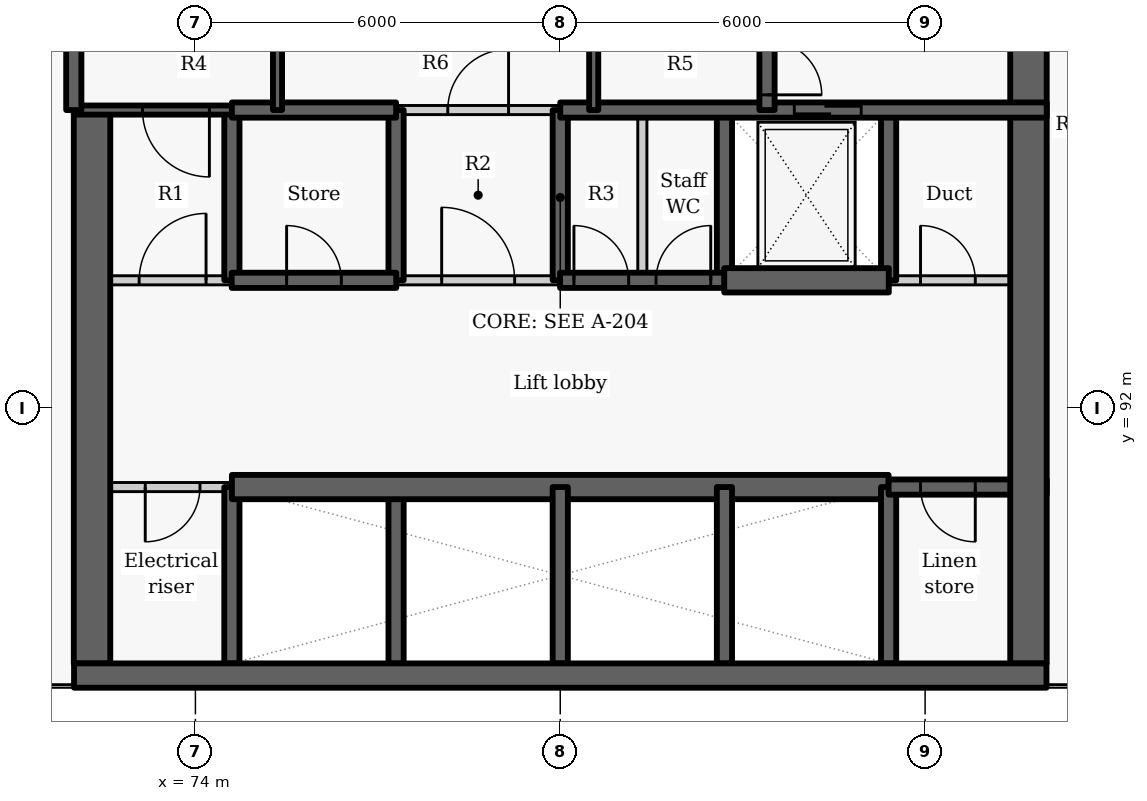
"""IFC4 building model, lengths in metres.
Left out: names, types, materials, properties, quantities, classifications, styles, units other than length and angle.
Written with IfcOpenShell. Run it as: python <this file> out.ifc"""

import sys

from ifc_helpers import new_model, si_unit, direction, frame, frame_2d, origin, place, context, subcontext, project, spatial, rectangle, extrude, element, fill, save


model = new_model("IFC4")
c1 = context("Model", 3, precision=1e-05, world=origin(), true_north=direction((0.0, 1.0)))
c2 = subcontext(c1, "Body", "Model", "MODEL_VIEW")
j1 = project(units=[si_unit("LENGTHUNIT", "METRE"), si_unit("PLANEANGLEUNIT", "RADIAN")], contexts=[c1])
p1 = place(None, origin())
s1 = spatial("IfcSite", under=j1, at=p1, CompositionType="ELEMENT")
p2 = place(p1, origin())
s2 = spatial("IfcBuilding", under=s1, at=p2, CompositionType="ELEMENT")
p3 = place(p2, frame((0.0, 0.0, 15.6)))
s3 = spatial("IfcBuildingStorey", under=s2, at=p3, CompositionType="ELEMENT", Elevation=15.6)
p4 = place(p3, frame((74.6, 87.8, -0.3), z_axis=(0.0, 0.0, 1.0), x_axis=(0.0, 1.0, 0.0)))
e1 = element("IfcWall", 1, at=p4, inside=s3, PredefinedType="SHEAR", context=c2, shape_type="SweptSolid", body=[
    extrude(rectangle(XDim=2.9, YDim=0.25, at=frame_2d((1.45, 0.0))), origin(), (0.0, 0.0, 1.0), 4.2),
])
p5 = place(p3, frame((74.6, 94.1, -0.3), z_axis=(0.0, 0.0, 1.0), x_axis=(0.0, 1.0, 0.0)))
e2 = element("IfcWall", 2, at=p5, inside=s3, PredefinedType="SHEAR", context=c2, shape_type="SweptSolid", body=[
    extrude(rectangle(XDim=2.8, YDim=0.25, at=frame_2d((1.4, 0.0))), origin(), (0.0, 0.0, 1.0), 4.2),
])
p6 = place(p3, frame((74.6, 90.7, 0.0), z_axis=(0.0, 0.0, 1.0), x_axis=(-1.0, 0.0, 0.0)))
e3 = element("IfcWall", 3, at=p6, inside=s3, PredefinedType="PARTITIONING", context=c2, shape_type="SweptSolid", body=[
    extrude(rectangle(XDim=2.6, YDim=0.15, at=frame_2d((1.3, 0.0))), origin(), (0.0, 0.0, 1.0), 3.9),
])
p7 = place(p6, frame((0.525, 0.0, 0.0)))
e4 = element("IfcOpeningElement", 4, at=p7, cuts=e3, PredefinedType="OPENING", context=c2, shape_type="SweptSolid", body=[
    extrude(rectangle(XDim=0.9, YDim=2.1, at=frame_2d((0.45, 1.05))), frame((0.0, 0.085, 0.0), z_axis=(0.0, -1.0, 0.0), x_axis=(1.0, 0.0, 0.0)), (0.0, 0.0, 1.0), 0.17),
])
p8 = place(p3, frame((72.3, 87.8, -0.3), z_axis=(0.0, 0.0, 1.0), x_axis=(0.0, 1.0, 0.0)))
e5 = element("IfcWall", 5, at=p8, inside=s3, PredefinedType="SHEAR", context=c2, shape_type="SweptSolid", body=[
    extrude(rectangle(XDim=9.1, YDim=0.6, at=frame_2d((4.55, 0.0))), origin(), (0.0, 0.0, 1.0), 4.2),
])
p9 = place(p3, frame((77.3, 87.8, -0.3), z_axis=(0.0, 0.0, 1.0), x_axis=(0.0, 1.0, 0.0)))
e6 = element("IfcWall", 6, at=p9, inside=s3, PredefinedType="SHEAR", context=c2, shape_type="SweptSolid", body=[
    extrude(rectangle(XDim=2.9, YDim=0.25, at=frame_2d((1.45, 0.0))), origin(), (0.0, 0.0, 1.0), 4.2),
])
p10 = place(p3, frame((77.3, 94.1, -0.3), z_axis=(0.0, 0.0, 1.0), x_axis=(0.0, 1.0, 0.0)))
e7 = element("IfcWall", 7, at=p10, inside=s3, PredefinedType="SHEAR", context=c2, shape_type="SweptSolid", body=[
    extrude(rectangle(XDim=2.8, YDim=0.25, at=frame_2d((1.4, 0.0))), origin(), (0.0, 0.0, 1.0), 4.2),
])
p11 = place(p3, frame((74.6, 90.7, -0.3), z_axis=(0.0, 0.0, 1.0), x_axis=(1.0, 0.0, 0.0)))
e8 = element("IfcWall", 8, at=p11, inside=s3, PredefinedType="SHEAR", context=c2, shape_type="SweptSolid", body=[
    extrude(rectangle(XDim=10.8, YDim=0.4, at=frame_2d((5.4, 0.0))), origin(), (0.0, 0.0, 1.0), 4.2),
])
p12 = place(p3, frame((80.0, 87.8, -0.3), z_axis=(0.0, 0.0, 1.0), x_axis=(0.0, 1.0, 0.0)))
e9 = element("IfcWall", 9, at=p12, inside=s3, PredefinedType="SHEAR", context=c2, shape_type="SweptSolid", body=[
    extrude(rectangle(XDim=2.9, YDim=0.25, at=frame_2d((1.45, 0.0))), origin(), (0.0, 0.0, 1.0), 4.2),
])
p13 = place(p3, frame((80.0, 94.1, -0.3), z_axis=(0.0, 0.0, 1.0), x_axis=(0.0, 1.0, 0.0)))
e10 = element("IfcWall", 10, at=p13, inside=s3, PredefinedType="SHEAR", context=c2, shape_type="SweptSolid", body=[
    extrude(rectangle(XDim=2.8, YDim=0.25, at=frame_2d((1.4, 0.0))), origin(), (0.0, 0.0, 1.0), 4.2),
])
p14 = place(p3, frame((82.7, 87.8, -0.3), z_axis=(0.0, 0.0, 1.0), x_axis=(0.0, 1.0, 0.0)))
e11 = element("IfcWall", 11, at=p14, inside=s3, PredefinedType="SHEAR", context=c2, shape_type="SweptSolid", body=[
    extrude(rectangle(XDim=2.9, YDim=0.25, at=frame_2d((1.45, 0.0))), origin(), (0.0, 0.0, 1.0), 4.2),
])
p15 = place(p3, frame((82.7, 94.1, -0.3), z_axis=(0.0, 0.0, 1.0), x_axis=(0.0, 1.0, 0.0)))
e12 = element("IfcWall", 12, at=p15, inside=s3, PredefinedType="SHEAR", context=c2, shape_type="SweptSolid", body=[
    extrude(rectangle(XDim=2.8, YDim=0.25, at=frame_2d((1.4, 0.0))), origin(), (0.0, 0.0, 1.0), 4.2),
])
p16 = place(p3, frame((85.4, 87.8, -0.3), z_axis=(0.0, 0.0, 1.0), x_axis=(0.0, 1.0, 0.0)))
e13 = element("IfcWall", 13, at=p16, inside=s3, PredefinedType="SHEAR", context=c2, shape_type="SweptSolid", body=[
    extrude(rectangle(XDim=2.9, YDim=0.25, at=frame_2d((1.45, 0.0))), origin(), (0.0, 0.0, 1.0), 4.2),
])
p17 = place(p3, frame((85.4, 94.1, -0.3), z_axis=(0.0, 0.0, 1.0), x_axis=(0.0, 1.0, 0.0)))
e14 = element("IfcWall", 14, at=p17, inside=s3, PredefinedType="SHEAR", context=c2, shape_type="SweptSolid", body=[
    extrude(rectangle(XDim=2.8, YDim=0.25, at=frame_2d((1.4, 0.0))), origin(), (0.0, 0.0, 1.0), 4.2),
])
p18 = place(p3, frame((88.0, 90.7, -0.3), z_axis=(0.0, 0.0, 1.0), x_axis=(-1.0, 0.0, 0.0)))
e15 = element("IfcWall", 15, at=p18, inside=s3, PredefinedType="SHEAR", context=c2, shape_type="SweptSolid", body=[
    extrude(rectangle(XDim=2.6, YDim=0.25, at=frame_2d((1.3, 0.0))), origin(), (0.0, 0.0, 1.0), 4.2),
])
p19 = place(p18, frame((1.175, 0.0, 0.3)))
e16 = element("IfcOpeningElement", 16, at=p19, cuts=e15, PredefinedType="OPENING", context=c2, shape_type="SweptSolid", body=[
    extrude(rectangle(XDim=0.9, YDim=2.1, at=frame_2d((0.45, 1.05))), frame((0.0, 0.135, 0.0), z_axis=(0.0, -1.0, 0.0), x_axis=(1.0, 0.0, 0.0)), (0.0, 0.0, 1.0), 0.27),
])
p20 = place(p3, frame((87.7, 103.4, -0.3), z_axis=(0.0, 0.0, 1.0), x_axis=(0.0, -1.0, 0.0)))
e17 = element("IfcWall", 17, at=p20, inside=s3, PredefinedType="SHEAR", context=c2, shape_type="SweptSolid", body=[
    extrude(rectangle(XDim=15.6, YDim=0.6, at=frame_2d((7.8, 0.0))), origin(), (0.0, 0.0, 1.0), 4.2),
])
p21 = place(p20, frame((2.7, 0.0, 0.3)))
e18 = element("IfcOpeningElement", 18, at=p21, cuts=e17, PredefinedType="OPENING", context=c2, shape_type="SweptSolid", body=[
    extrude(rectangle(XDim=1.1, YDim=2.1, at=frame_2d((0.55, 1.05))), frame((0.0, 0.31, 0.0), z_axis=(0.0, -1.0, 0.0), x_axis=(1.0, 0.0, 0.0)), (0.0, 0.0, 1.0), 0.62),
])
p22 = place(p3, frame((72.0, 94.1, 0.0), z_axis=(0.0, 0.0, 1.0), x_axis=(1.0, 0.0, 0.0)))
e19 = element("IfcWall", 19, at=p22, inside=s3, PredefinedType="PARTITIONING", context=c2, shape_type="SweptSolid", body=[
    extrude(rectangle(XDim=2.603, YDim=0.15, at=frame_2d((1.302, 0.0))), origin(), (0.0, 0.0, 1.0), 3.9),
])
p23 = place(p22, frame((1.075, 0.0, 0.0)))
e20 = element("IfcOpeningElement", 20, at=p23, cuts=e19, PredefinedType="OPENING", context=c2, shape_type="SweptSolid", body=[
    extrude(rectangle(XDim=1.1, YDim=2.1, at=frame_2d((0.55, 1.05))), frame((0.0, 0.085, 0.0), z_axis=(0.0, -1.0, 0.0), x_axis=(1.0, 0.0, 0.0)), (0.0, 0.0, 1.0), 0.17),
])
p24 = place(p3, frame((77.297, 94.1, 0.0), z_axis=(0.0, 0.0, 1.0), x_axis=(1.0, 0.0, 0.0)))
e21 = element("IfcWall", 21, at=p24, inside=s3, PredefinedType="PARTITIONING", context=c2, shape_type="SweptSolid", body=[
    extrude(rectangle(XDim=2.706, YDim=0.15, at=frame_2d((1.353, 0.0))), origin(), (0.0, 0.0, 1.0), 3.9),
])
p25 = place(p24, frame((0.753, 0.0, 0.0)))
e22 = element("IfcOpeningElement", 22, at=p25, cuts=e21, PredefinedType="OPENING", context=c2, shape_type="SweptSolid", body=[
    extrude(rectangle(XDim=1.2, YDim=2.1, at=frame_2d((0.6, 1.05))), frame((0.0, 0.085, 0.0), z_axis=(0.0, -1.0, 0.0), x_axis=(1.0, 0.0, 0.0)), (0.0, 0.0, 1.0), 0.17),
])
p26 = place(p3, frame((85.397, 94.1, 0.0), z_axis=(0.0, 0.0, 1.0), x_axis=(1.0, 0.0, 0.0)))
e23 = element("IfcWall", 23, at=p26, inside=s3, PredefinedType="PARTITIONING", context=c2, shape_type="SweptSolid", body=[
    extrude(rectangle(XDim=2.603, YDim=0.15, at=frame_2d((1.302, 0.0))), origin(), (0.0, 0.0, 1.0), 3.9),
])
p27 = place(p26, frame((0.528, 0.0, 0.0)))
e24 = element("IfcOpeningElement", 24, at=p27, cuts=e23, PredefinedType="OPENING", context=c2, shape_type="SweptSolid", body=[
    extrude(rectangle(XDim=0.9, YDim=2.1, at=frame_2d((0.45, 1.05))), frame((0.0, 0.085, 0.0), z_axis=(0.0, -1.0, 0.0), x_axis=(1.0, 0.0, 0.0)), (0.0, 0.0, 1.0), 0.17),
])
p28 = place(p3, frame((74.597, 94.1, -0.3), z_axis=(0.0, 0.0, 1.0), x_axis=(1.0, 0.0, 0.0)))
e25 = element("IfcWall", 25, at=p28, inside=s3, PredefinedType="SHEAR", context=c2, shape_type="SweptSolid", body=[
    extrude(rectangle(XDim=2.706, YDim=0.25, at=frame_2d((1.353, 0.0))), origin(), (0.0, 0.0, 1.0), 4.2),
])
p29 = place(p28, frame((0.903, 0.0, 0.3)))
e26 = element("IfcOpeningElement", 26, at=p29, cuts=e25, PredefinedType="OPENING", context=c2, shape_type="SweptSolid", body=[
    extrude(rectangle(XDim=0.9, YDim=2.1, at=frame_2d((0.45, 1.05))), frame((0.0, 0.135, 0.0), z_axis=(0.0, -1.0, 0.0), x_axis=(1.0, 0.0, 0.0)), (0.0, 0.0, 1.0), 0.27),
])
p30 = place(p3, frame((79.997, 94.1, -0.3), z_axis=(0.0, 0.0, 1.0), x_axis=(1.0, 0.0, 0.0)))
e27 = element("IfcWall", 27, at=p30, inside=s3, PredefinedType="SHEAR", context=c2, shape_type="SweptSolid", body=[
    extrude(rectangle(XDim=2.706, YDim=0.25, at=frame_2d((1.353, 0.0))), origin(), (0.0, 0.0, 1.0), 4.2),
])
p31 = place(p30, frame((0.228, 0.0, 0.3)))
e28 = element("IfcOpeningElement", 28, at=p31, cuts=e27, PredefinedType="OPENING", context=c2, shape_type="SweptSolid", body=[
    extrude(rectangle(XDim=0.9, YDim=2.1, at=frame_2d((0.45, 1.05))), frame((0.0, 0.135, 0.0), z_axis=(0.0, -1.0, 0.0), x_axis=(1.0, 0.0, 0.0)), (0.0, 0.0, 1.0), 0.27),
])
p32 = place(p30, frame((1.578, 0.0, 0.3)))
e29 = element("IfcOpeningElement", 29, at=p32, cuts=e27, PredefinedType="OPENING", context=c2, shape_type="SweptSolid", body=[
    extrude(rectangle(XDim=0.9, YDim=2.1, at=frame_2d((0.45, 1.05))), frame((0.0, 0.135, 0.0), z_axis=(0.0, -1.0, 0.0), x_axis=(1.0, 0.0, 0.0)), (0.0, 0.0, 1.0), 0.27),
])
p33 = place(p3, frame((82.697, 94.1, -0.3), z_axis=(0.0, 0.0, 1.0), x_axis=(1.0, 0.0, 0.0)))
e30 = element("IfcWall", 30, at=p33, inside=s3, PredefinedType="SHEAR", context=c2, shape_type="SweptSolid", body=[
    extrude(rectangle(XDim=2.706, YDim=0.4, at=frame_2d((1.353, 0.0))), origin(), (0.0, 0.0, 1.0), 4.2),
])
p34 = place(p3, frame((74.6, 96.9, -0.3), z_axis=(0.0, 0.0, 1.0), x_axis=(-1.0, 0.0, 0.0)))
e31 = element("IfcWall", 31, at=p34, inside=s3, PredefinedType="SHEAR", context=c2, shape_type="SweptSolid", body=[
    extrude(rectangle(XDim=2.6, YDim=0.15, at=frame_2d((1.3, 0.0))), origin(), (0.0, 0.0, 1.0), 4.2),
])
p35 = place(p34, frame((0.37, 0.0, 0.3)))
e32 = element("IfcOpeningElement", 32, at=p35, cuts=e31, PredefinedType="OPENING", context=c2, shape_type="SweptSolid", body=[
    extrude(rectangle(XDim=1.1, YDim=2.1, at=frame_2d((0.55, 1.05))), frame((0.0, 0.085, 0.0), z_axis=(0.0, -1.0, 0.0), x_axis=(1.0, 0.0, 0.0)), (0.0, 0.0, 1.0), 0.17),
])
p36 = place(p3, frame((74.6, 96.9, -0.3), z_axis=(0.0, 0.0, 1.0), x_axis=(1.0, 0.0, 0.0)))
e33 = element("IfcWall", 33, at=p36, inside=s3, PredefinedType="SHEAR", context=c2, shape_type="SweptSolid", body=[
    extrude(rectangle(XDim=2.7, YDim=0.25, at=frame_2d((1.35, 0.0))), origin(), (0.0, 0.0, 1.0), 4.2),
])
p37 = place(p3, frame((80.0, 96.9, -0.3), z_axis=(0.0, 0.0, 1.0), x_axis=(1.0, 0.0, 0.0)))
e34 = element("IfcWall", 34, at=p37, inside=s3, PredefinedType="SHEAR", context=c2, shape_type="SweptSolid", body=[
    extrude(rectangle(XDim=8.0, YDim=0.25, at=frame_2d((4.0, 0.0))), origin(), (0.0, 0.0, 1.0), 4.2),
])
p38 = place(p37, frame((3.849, 0.0, 0.3)))
e35 = element("IfcOpeningElement", 35, at=p38, cuts=e34, PredefinedType="OPENING", context=c2, shape_type="SweptSolid", body=[
    extrude(rectangle(XDim=1.1, YDim=2.1, at=frame_2d((0.55, 1.05))), frame((0.0, 0.135, 0.0), z_axis=(0.0, -1.0, 0.0), x_axis=(1.0, 0.0, 0.0)), (0.0, 0.0, 1.0), 0.27),
])
p39 = place(p3, frame((77.3, 96.9, 0.0), z_axis=(0.0, 0.0, 1.0), x_axis=(1.0, 0.0, 0.0)))
e36 = element("IfcWall", 36, at=p39, inside=s3, PredefinedType="PARTITIONING", context=c2, shape_type="SweptSolid", body=[
    extrude(rectangle(XDim=2.7, YDim=0.15, at=frame_2d((1.35, 0.0))), origin(), (0.0, 0.0, 1.0), 3.9),
])
p40 = place(p39, frame((0.85, 0.0, 0.0)))
e37 = element("IfcOpeningElement", 37, at=p40, cuts=e36, PredefinedType="OPENING", context=c2, shape_type="SweptSolid", body=[
    extrude(rectangle(XDim=1.0, YDim=2.1, at=frame_2d((0.5, 1.05))), frame((0.0, 0.085, 0.0), z_axis=(0.0, -1.0, 0.0), x_axis=(1.0, 0.0, 0.0)), (0.0, 0.0, 1.0), 0.17),
])
p41 = place(p3, frame((81.35, 94.1, 0.0), z_axis=(0.0, 0.0, 1.0), x_axis=(0.0, 1.0, 0.0)))
e38 = element("IfcWall", 38, at=p41, inside=s3, PredefinedType="PARTITIONING", context=c2, shape_type="SweptSolid", body=[
    extrude(rectangle(XDim=2.8, YDim=0.15, at=frame_2d((1.4, 0.0))), origin(), (0.0, 0.0, 1.0), 3.9),
])
p42 = place(p3, frame((75.35, 96.9, -0.3), z_axis=(0.0, 0.0, 1.0), x_axis=(0.0, 1.0, 0.0)))
e39 = element("IfcWall", 39, at=p42, inside=s3, PredefinedType="SHEAR", context=c2, shape_type="SweptSolid", body=[
    extrude(rectangle(XDim=1.503, YDim=0.15, at=frame_2d((0.751, 0.0))), origin(), (0.0, 0.0, 1.0), 4.2),
])
p43 = place(p3, frame((72.0, 96.9, -0.3), z_axis=(0.0, 0.0, 1.0), x_axis=(0.0, 1.0, 0.0)))
e40 = element("IfcWall", 40, at=p43, inside=s3, PredefinedType="SHEAR", context=c2, shape_type="SweptSolid", body=[
    extrude(rectangle(XDim=6.5, YDim=0.25, at=frame_2d((3.25, 0.0))), origin(), (0.0, 0.0, 1.0), 4.2),
])
p44 = place(p3, frame((83.4, 103.4, -0.3), z_axis=(0.0, 0.0, 1.0), x_axis=(0.0, -1.0, 0.0)))
e41 = element("IfcWall", 41, at=p44, inside=s3, PredefinedType="SHEAR", context=c2, shape_type="SweptSolid", body=[
    extrude(rectangle(XDim=6.5, YDim=0.25, at=frame_2d((3.25, 0.0))), origin(), (0.0, 0.0, 1.0), 4.2),
])
p45 = place(p44, frame((5.35, 0.0, 0.3)))
e42 = element("IfcOpeningElement", 42, at=p45, cuts=e41, PredefinedType="OPENING", context=c2, shape_type="SweptSolid", body=[
    extrude(rectangle(XDim=0.9, YDim=2.1, at=frame_2d((0.45, 1.05))), frame((0.0, 0.135, 0.0), z_axis=(0.0, -1.0, 0.0), x_axis=(1.0, 0.0, 0.0)), (0.0, 0.0, 1.0), 0.27),
])
p46 = place(p3, frame((80.55, 96.9, -0.3), z_axis=(0.0, 0.0, 1.0), x_axis=(0.0, 1.0, 0.0)))
e43 = element("IfcWall", 43, at=p46, inside=s3, PredefinedType="SHEAR", context=c2, shape_type="SweptSolid", body=[
    extrude(rectangle(XDim=1.503, YDim=0.15, at=frame_2d((0.751, 0.0))), origin(), (0.0, 0.0, 1.0), 4.2),
])
p47 = place(p3, frame((72.004, 87.6, -0.3), z_axis=(0.0, 0.0, 1.0), x_axis=(1.0, 0.0, 0.0)))
e44 = element("IfcWall", 44, at=p47, inside=s3, PredefinedType="SHEAR", context=c2, shape_type="SweptSolid", body=[
    extrude(rectangle(XDim=15.992, YDim=0.4, at=frame_2d((7.996, 0.0))), origin(), (0.0, 0.0, 1.0), 4.2),
])
p48 = place(p7, origin())
e45 = element("IfcDoor", 45, at=p48, inside=s3, OperationType="SINGLE_SWING_RIGHT", PredefinedType="DOOR", context=c2, shape_type="SweptSolid", body=[
    extrude(rectangle(XDim=0.9, YDim=2.1, at=frame_2d((0.45, 1.05))), frame((0.0, 0.025, 0.0), z_axis=(0.0, -1.0, 0.0), x_axis=(1.0, 0.0, 0.0)), (0.0, 0.0, 1.0), 0.05),
])
fill(e4, e45)
p49 = place(p19, origin())
e46 = element("IfcDoor", 46, at=p49, inside=s3, OperationType="SINGLE_SWING_LEFT", PredefinedType="DOOR", context=c2, shape_type="SweptSolid", body=[
    extrude(rectangle(XDim=0.9, YDim=2.1, at=frame_2d((0.45, 1.05))), frame((0.0, 0.025, 0.0), z_axis=(0.0, -1.0, 0.0), x_axis=(1.0, 0.0, 0.0)), (0.0, 0.0, 1.0), 0.05),
])
fill(e16, e46)
p50 = place(p23, origin())
e47 = element("IfcDoor", 47, at=p50, inside=s3, OperationType="SINGLE_SWING_RIGHT", PredefinedType="DOOR", context=c2, shape_type="SweptSolid", body=[
    extrude(rectangle(XDim=1.1, YDim=2.1, at=frame_2d((0.55, 1.05))), frame((0.0, 0.025, 0.0), z_axis=(0.0, -1.0, 0.0), x_axis=(1.0, 0.0, 0.0)), (0.0, 0.0, 1.0), 0.05),
])
fill(e20, e47)
p51 = place(p29, origin())
e48 = element("IfcDoor", 48, at=p51, inside=s3, OperationType="SINGLE_SWING_LEFT", PredefinedType="DOOR", context=c2, shape_type="SweptSolid", body=[
    extrude(rectangle(XDim=0.9, YDim=2.1, at=frame_2d((0.45, 1.05))), frame((0.0, 0.025, 0.0), z_axis=(0.0, -1.0, 0.0), x_axis=(1.0, 0.0, 0.0)), (0.0, 0.0, 1.0), 0.05),
])
fill(e26, e48)
p52 = place(p25, origin())
e49 = element("IfcDoor", 49, at=p52, inside=s3, OperationType="DOUBLE_DOOR_SINGLE_SWING", PredefinedType="DOOR", context=c2, shape_type="SweptSolid", body=[
    extrude(rectangle(XDim=1.2, YDim=2.1, at=frame_2d((0.6, 1.05))), frame((0.0, 0.025, 0.0), z_axis=(0.0, -1.0, 0.0), x_axis=(1.0, 0.0, 0.0)), (0.0, 0.0, 1.0), 0.05),
])
fill(e22, e49)
p53 = place(p31, origin())
e50 = element("IfcDoor", 50, at=p53, inside=s3, OperationType="SINGLE_SWING_LEFT", PredefinedType="DOOR", context=c2, shape_type="SweptSolid", body=[
    extrude(rectangle(XDim=0.9, YDim=2.1, at=frame_2d((0.45, 1.05))), frame((0.0, 0.025, 0.0), z_axis=(0.0, -1.0, 0.0), x_axis=(1.0, 0.0, 0.0)), (0.0, 0.0, 1.0), 0.05),
])
fill(e28, e50)
p54 = place(p32, origin())
e51 = element("IfcDoor", 51, at=p54, inside=s3, OperationType="SINGLE_SWING_RIGHT", PredefinedType="DOOR", context=c2, shape_type="SweptSolid", body=[
    extrude(rectangle(XDim=0.9, YDim=2.1, at=frame_2d((0.45, 1.05))), frame((0.0, 0.025, 0.0), z_axis=(0.0, -1.0, 0.0), x_axis=(1.0, 0.0, 0.0)), (0.0, 0.0, 1.0), 0.05),
])
fill(e29, e51)
p55 = place(p38, origin())
e52 = element("IfcDoor", 52, at=p55, inside=s3, OperationType="SLIDING_TO_LEFT", PredefinedType="DOOR", context=c2, shape_type="SweptSolid", body=[
    extrude(rectangle(XDim=1.1, YDim=2.1, at=frame_2d((0.55, 1.05))), frame((0.0, 0.025, 0.0), z_axis=(0.0, -1.0, 0.0), x_axis=(1.0, 0.0, 0.0)), (0.0, 0.0, 1.0), 0.05),
])
fill(e35, e52)
p56 = place(p27, origin())
e53 = element("IfcDoor", 53, at=p56, inside=s3, OperationType="SINGLE_SWING_LEFT", PredefinedType="DOOR", context=c2, shape_type="SweptSolid", body=[
    extrude(rectangle(XDim=0.9, YDim=2.1, at=frame_2d((0.45, 1.05))), frame((0.0, 0.025, 0.0), z_axis=(0.0, -1.0, 0.0), x_axis=(1.0, 0.0, 0.0)), (0.0, 0.0, 1.0), 0.05),
])
fill(e24, e53)
p57 = place(p40, origin())
e54 = element("IfcDoor", 54, at=p57, inside=s3, OperationType="SINGLE_SWING_RIGHT", PredefinedType="DOOR", context=c2, shape_type="SweptSolid", body=[
    extrude(rectangle(XDim=1.0, YDim=2.1, at=frame_2d((0.5, 1.05))), frame((0.0, 0.025, 0.0), z_axis=(0.0, -1.0, 0.0), x_axis=(1.0, 0.0, 0.0)), (0.0, 0.0, 1.0), 0.05),
])
fill(e37, e54)
p58 = place(p35, origin())
e55 = element("IfcDoor", 55, at=p58, inside=s3, OperationType="SINGLE_SWING_LEFT", PredefinedType="DOOR", context=c2, shape_type="SweptSolid", body=[
    extrude(rectangle(XDim=1.1, YDim=2.1, at=frame_2d((0.55, 1.05))), frame((0.0, 0.025, 0.0), z_axis=(0.0, -1.0, 0.0), x_axis=(1.0, 0.0, 0.0)), (0.0, 0.0, 1.0), 0.05),
])
fill(e32, e55)
p59 = place(p45, origin())
e56 = element("IfcDoor", 56, at=p59, inside=s3, OperationType="SINGLE_SWING_RIGHT", PredefinedType="DOOR", context=c2, shape_type="SweptSolid", body=[
    extrude(rectangle(XDim=0.9, YDim=2.1, at=frame_2d((0.45, 1.05))), frame((0.0, 0.025, 0.0), z_axis=(0.0, -1.0, 0.0), x_axis=(1.0, 0.0, 0.0)), (0.0, 0.0, 1.0), 0.05),
])
fill(e42, e56)
save(model, sys.argv[1])
